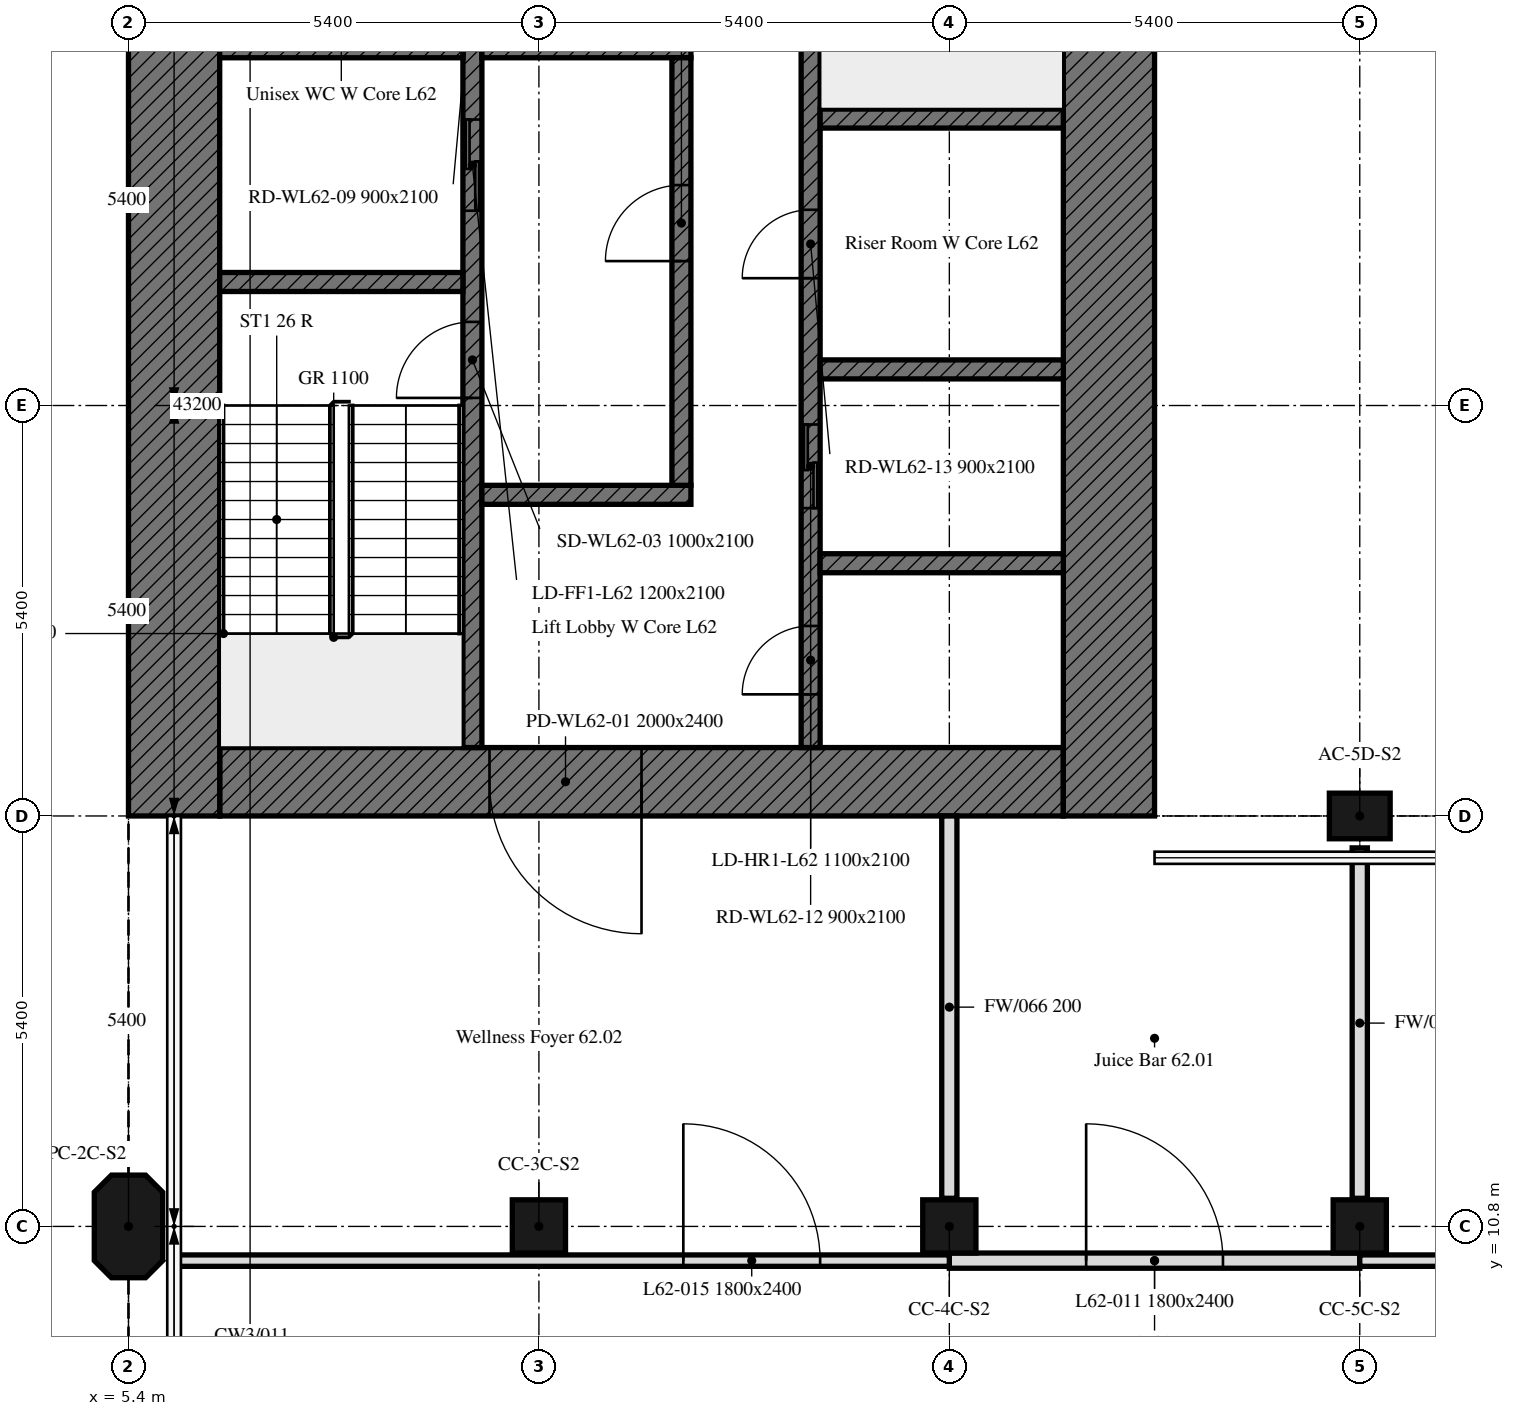
"""IFC4 building model, lengths in metres.
Left out: names, types, materials, properties, quantities, classifications, styles, units other than length and angle.
Written with IfcOpenShell. Run it as: python <this file> out.ifc"""

import sys

from ifc_helpers import new_model, si_unit, direction, frame, frame_2d, origin, origin_2d, place, context, subcontext, project, spatial, polyline, rectangle, outline, extrude, element, fill, save


model = new_model("IFC4")
c1 = context("Model", 3, precision=1e-05, world=origin(), true_north=direction((0.0, 1.0)))
c2 = subcontext(c1, "Body", "Model", "MODEL_VIEW")
j1 = project(units=[si_unit("LENGTHUNIT", "METRE"), si_unit("PLANEANGLEUNIT", "RADIAN")], contexts=[c1])
p1 = place(None, origin())
s1 = spatial("IfcSite", under=j1, at=p1, CompositionType="ELEMENT")
p2 = place(p1, origin())
s2 = spatial("IfcBuilding", under=s1, at=p2, CompositionType="ELEMENT")
p3 = place(p2, frame((0.0, 0.0, 255.7)))
s3 = spatial("IfcBuildingStorey", under=s2, at=p3, CompositionType="ELEMENT", Elevation=255.7)
p4 = place(p3, frame((5.4, 10.8, 0.0), z_axis=(0.0, 0.0, 1.0), x_axis=(0.0, 1.0, 0.0)))
e1 = element("IfcColumn", 1, at=p4, inside=s3, PredefinedType="COLUMN", context=c2, shape_type="SweptSolid", body=[
    extrude(outline(polyline([(-0.45, -0.45), (0.45, -0.45), (0.675, -0.225), (0.675, 0.225), (0.45, 0.45), (-0.45, 0.45), (-0.675, 0.225), (-0.675, -0.225), (-0.45, -0.45)])), origin(), (0.0, 0.0, 1.0), 4.5),
])
for number, where, z_axis, x_axis in (
    (2, (10.8, 10.8, 0.0), (0.0, 0.0, 1.0), (1.0, 0.0, 0.0)),
    (3, (16.2, 10.8, 0.0), (0.0, 0.0, 1.0), (1.0, 0.0, 0.0)),
    (4, (21.6, 10.8, 0.0), (0.0, 0.0, 1.0), (1.0, 0.0, 0.0)),
):
    element("IfcColumn", number, at=place(p3, frame(where, z_axis=z_axis, x_axis=x_axis)), inside=s3, PredefinedType="COLUMN", context=c2, shape_type="SweptSolid", body=[
        extrude(rectangle(XDim=0.7, YDim=0.7, at=origin_2d()), origin(), (0.0, 0.0, 1.0), 4.5),
    ])
p5 = place(p3, frame((21.6, 16.2, 0.0), z_axis=(0.0, 0.0, 1.0), x_axis=(1.0, 0.0, 0.0)))
e5 = element("IfcColumn", 5, at=p5, inside=s3, PredefinedType="COLUMN", context=c2, shape_type="SweptSolid", body=[
    extrude(rectangle(XDim=0.8, YDim=0.6, at=origin_2d()), origin(), (0.0, 0.0, 1.0), 4.5),
])
p6 = place(p3, frame((17.7, 16.65, 0.0), z_axis=(0.0, 0.0, 1.0), x_axis=(-1.0, 0.0, 0.0)))
e6 = element("IfcWall", 6, at=p6, inside=s3, PredefinedType="SOLIDWALL", context=c2, shape_type="SweptSolid", body=[
    extrude(rectangle(XDim=11.1, YDim=0.9, at=frame_2d((5.55, 0.0))), origin(), (0.0, 0.0, 1.0), 4.5),
])
p7 = place(p6, frame((5.55, 0.0, 0.0)))
e7 = element("IfcOpeningElement", 7, at=p7, cuts=e6, PredefinedType="OPENING", context=c2, shape_type="SweptSolid", body=[
    extrude(rectangle(XDim=2.0, YDim=2.4, at=frame_2d((1.0, 1.2))), frame((0.0, 0.45, 0.0), z_axis=(0.0, -1.0, 0.0), x_axis=(1.0, 0.0, 0.0)), (0.0, 0.0, 1.0), 0.9),
])
for number, where, z_axis, x_axis in (
    (8, (6.0, 16.2, 0.0), (0.0, 0.0, 1.0), (0.0, 1.0, 0.0)),
    (9, (18.3, 32.4, 0.0), (0.0, 0.0, 1.0), (0.0, -1.0, 0.0)),
):
    element("IfcWall", number, at=place(p3, frame(where, z_axis=z_axis, x_axis=x_axis)), inside=s3, PredefinedType="SOLIDWALL", context=c2, shape_type="SweptSolid", body=[
        extrude(rectangle(XDim=16.2, YDim=1.2, at=frame_2d((8.1, 0.0))), origin(), (0.0, 0.0, 1.0), 4.5),
    ])
p8 = place(p3, frame((9.925, 17.1, 0.0), z_axis=(0.0, 0.0, 1.0), x_axis=(0.0, 1.0, 0.0)))
e10 = element("IfcWall", 10, at=p8, inside=s3, PredefinedType="SOLIDWALL", context=c2, shape_type="SweptSolid", body=[
    extrude(rectangle(XDim=14.4, YDim=0.25, at=frame_2d((7.2, 0.0))), origin(), (0.0, 0.0, 1.0), 4.5),
])
p9 = place(p8, frame((4.6, 0.0, 0.0)))
e11 = element("IfcOpeningElement", 11, at=p9, cuts=e10, PredefinedType="OPENING", context=c2, shape_type="SweptSolid", body=[
    extrude(rectangle(XDim=1.0, YDim=2.1, at=frame_2d((0.5, 1.05))), frame((0.0, 0.125, 0.0), z_axis=(0.0, -1.0, 0.0), x_axis=(1.0, 0.0, 0.0)), (0.0, 0.0, 1.0), 0.25),
])
p10 = place(p8, frame((7.062, 0.0, 0.0)))
e12 = element("IfcOpeningElement", 12, at=p10, cuts=e10, PredefinedType="OPENING", context=c2, shape_type="SweptSolid", body=[
    extrude(rectangle(XDim=1.2, YDim=2.1, at=frame_2d((0.6, 1.05))), frame((0.0, 0.125, 0.0), z_axis=(0.0, -1.0, 0.0), x_axis=(1.0, 0.0, 0.0)), (0.0, 0.0, 1.0), 0.25),
])
p11 = place(p8, frame((9.726, 0.0, 0.0)))
e13 = element("IfcOpeningElement", 13, at=p11, cuts=e10, PredefinedType="OPENING", context=c2, shape_type="SweptSolid", body=[
    extrude(rectangle(XDim=0.9, YDim=2.1, at=frame_2d((0.45, 1.05))), frame((0.0, 0.125, 0.0), z_axis=(0.0, -1.0, 0.0), x_axis=(1.0, 0.0, 0.0)), (0.0, 0.0, 1.0), 0.25),
])
p12 = place(p8, frame((11.539, 0.0, 0.0)))
e14 = element("IfcOpeningElement", 14, at=p12, cuts=e10, PredefinedType="OPENING", context=c2, shape_type="SweptSolid", body=[
    extrude(rectangle(XDim=0.9, YDim=2.1, at=frame_2d((0.45, 1.05))), frame((0.0, 0.125, 0.0), z_axis=(0.0, -1.0, 0.0), x_axis=(1.0, 0.0, 0.0)), (0.0, 0.0, 1.0), 0.25),
])
p13 = place(p8, frame((13.226, 0.0, 0.0)))
e15 = element("IfcOpeningElement", 15, at=p13, cuts=e10, PredefinedType="OPENING", context=c2, shape_type="SweptSolid", body=[
    extrude(rectangle(XDim=0.9, YDim=2.1, at=frame_2d((0.45, 1.05))), frame((0.0, 0.125, 0.0), z_axis=(0.0, -1.0, 0.0), x_axis=(1.0, 0.0, 0.0)), (0.0, 0.0, 1.0), 0.25),
])
p14 = place(p3, frame((14.375, 17.1, 0.0), z_axis=(0.0, 0.0, 1.0), x_axis=(0.0, 1.0, 0.0)))
e16 = element("IfcWall", 16, at=p14, inside=s3, PredefinedType="SOLIDWALL", context=c2, shape_type="SweptSolid", body=[
    extrude(rectangle(XDim=14.4, YDim=0.25, at=frame_2d((7.2, 0.0))), origin(), (0.0, 0.0, 1.0), 4.5),
])
p15 = place(p14, frame((13.15, 0.0, 0.0)))
e17 = element("IfcOpeningElement", 17, at=p15, cuts=e16, PredefinedType="OPENING", context=c2, shape_type="SweptSolid", body=[
    extrude(rectangle(XDim=1.0, YDim=2.1, at=frame_2d((0.5, 1.05))), frame((0.0, 0.125, 0.0), z_axis=(0.0, -1.0, 0.0), x_axis=(1.0, 0.0, 0.0)), (0.0, 0.0, 1.0), 0.25),
])
p16 = place(p14, frame((3.15, 0.0, 0.0)))
e18 = element("IfcOpeningElement", 18, at=p16, cuts=e16, PredefinedType="OPENING", context=c2, shape_type="SweptSolid", body=[
    extrude(rectangle(XDim=1.1, YDim=2.1, at=frame_2d((0.55, 1.05))), frame((0.0, 0.125, 0.0), z_axis=(0.0, -1.0, 0.0), x_axis=(1.0, 0.0, 0.0)), (0.0, 0.0, 1.0), 0.25),
])
p17 = place(p14, frame((0.7, 0.0, 0.0)))
e19 = element("IfcOpeningElement", 19, at=p17, cuts=e16, PredefinedType="OPENING", context=c2, shape_type="SweptSolid", body=[
    extrude(rectangle(XDim=0.9, YDim=2.1, at=frame_2d((0.45, 1.05))), frame((0.0, 0.125, 0.0), z_axis=(0.0, -1.0, 0.0), x_axis=(1.0, 0.0, 0.0)), (0.0, 0.0, 1.0), 0.25),
])
p18 = place(p14, frame((6.175, 0.0, 0.0)))
e20 = element("IfcOpeningElement", 20, at=p18, cuts=e16, PredefinedType="OPENING", context=c2, shape_type="SweptSolid", body=[
    extrude(rectangle(XDim=0.9, YDim=2.1, at=frame_2d((0.45, 1.05))), frame((0.0, 0.125, 0.0), z_axis=(0.0, -1.0, 0.0), x_axis=(1.0, 0.0, 0.0)), (0.0, 0.0, 1.0), 0.25),
])
for number, where, z_axis, x_axis in (
    (21, (6.6, 23.225, 0.0), (0.0, 0.0, 1.0), (1.0, 0.0, 0.0)),
    (22, (14.5, 25.375, 0.0), (0.0, 0.0, 1.0), (1.0, 0.0, 0.0)),
    (23, (14.5, 22.075, 0.0), (0.0, 0.0, 1.0), (1.0, 0.0, 0.0)),
    (24, (6.6, 26.3, 0.0), (0.0, 0.0, 1.0), (1.0, 0.0, 0.0)),
):
    element("IfcWall", number, at=place(p3, frame(where, z_axis=z_axis, x_axis=x_axis)), inside=s3, PredefinedType="SOLIDWALL", context=c2, shape_type="SweptSolid", body=[
        extrude(rectangle(XDim=3.2, YDim=0.25, at=frame_2d((1.6, 0.0))), origin(), (0.0, 0.0, 1.0), 4.5),
    ])
for number, where, z_axis, x_axis in (
    (25, (10.05, 26.3, 0.0), (0.0, 0.0, 1.0), (1.0, 0.0, 0.0)),
    (26, (10.05, 20.425, 0.0), (0.0, 0.0, 1.0), (1.0, 0.0, 0.0)),
):
    element("IfcWall", number, at=place(p3, frame(where, z_axis=z_axis, x_axis=x_axis)), inside=s3, PredefinedType="SOLIDWALL", context=c2, shape_type="SweptSolid", body=[
        extrude(rectangle(XDim=2.75, YDim=0.25, at=frame_2d((1.375, 0.0))), origin(), (0.0, 0.0, 1.0), 4.5),
    ])
p19 = place(p3, frame((12.675, 20.55, 0.0), z_axis=(0.0, 0.0, 1.0), x_axis=(0.0, 1.0, 0.0)))
e27 = element("IfcWall", 27, at=p19, inside=s3, PredefinedType="SOLIDWALL", context=c2, shape_type="SweptSolid", body=[
    extrude(rectangle(XDim=5.625, YDim=0.25, at=frame_2d((2.812, 0.0))), origin(), (0.0, 0.0, 1.0), 4.5),
])
p20 = place(p19, frame((2.95, 0.0, 0.0)))
e28 = element("IfcOpeningElement", 28, at=p20, cuts=e27, PredefinedType="OPENING", context=c2, shape_type="SweptSolid", body=[
    extrude(rectangle(XDim=1.0, YDim=2.1, at=frame_2d((0.5, 1.05))), frame((0.0, 0.125, 0.0), z_axis=(0.0, -1.0, 0.0), x_axis=(1.0, 0.0, 0.0)), (0.0, 0.0, 1.0), 0.25),
])
p21 = place(p3, frame((14.5, 19.525, 0.0), z_axis=(0.0, 0.0, 1.0), x_axis=(1.0, 0.0, 0.0)))
e29 = element("IfcWall", 29, at=p21, inside=s3, PredefinedType="SOLIDWALL", context=c2, shape_type="SweptSolid", body=[
    extrude(rectangle(XDim=3.2, YDim=0.25, at=frame_2d((1.6, 0.0))), origin(), (0.0, 0.0, 1.0), 4.5),
])
p22 = place(p3, frame((21.6, 15.78, 0.0), z_axis=(0.0, 0.0, 1.0), x_axis=(0.0, -1.0, 0.0)))
e30 = element("IfcWall", 30, at=p22, inside=s3, PredefinedType="PARTITIONING", context=c2, shape_type="SweptSolid", body=[
    extrude(rectangle(XDim=4.61, YDim=0.2, at=frame_2d((2.305, 0.0))), origin(), (0.0, 0.0, 1.0), 3.75),
])
p23 = place(p3, frame((16.2, 10.35, 0.0), z_axis=(0.0, 0.0, 1.0), x_axis=(1.0, 0.0, 0.0)))
e31 = element("IfcWall", 31, at=p23, inside=s3, PredefinedType="PARTITIONING", context=c2, shape_type="SweptSolid", body=[
    extrude(rectangle(XDim=5.4, YDim=0.2, at=frame_2d((2.7, 0.0))), origin(), (0.0, 0.0, 1.0), 4.5),
])
p24 = place(p23, frame((1.8, 0.0, 0.0)))
e32 = element("IfcOpeningElement", 32, at=p24, cuts=e31, PredefinedType="OPENING", context=c2, shape_type="SweptSolid", body=[
    extrude(rectangle(XDim=1.8, YDim=2.4, at=frame_2d((0.9, 1.2))), frame((0.0, 0.1, 0.0), z_axis=(0.0, -1.0, 0.0), x_axis=(1.0, 0.0, 0.0)), (0.0, 0.0, 1.0), 0.2),
])
p25 = place(p3, frame((16.2, 16.2, 0.0), z_axis=(0.0, 0.0, 1.0), x_axis=(0.0, -1.0, 0.0)))
e33 = element("IfcWall", 33, at=p25, inside=s3, PredefinedType="PARTITIONING", context=c2, shape_type="SweptSolid", body=[
    extrude(rectangle(XDim=5.03, YDim=0.2, at=frame_2d((2.515, 0.0))), origin(), (0.0, 0.0, 1.0), 3.75),
])
p26 = place(p3, frame((21.6, 10.35, 0.0), z_axis=(0.0, 0.0, 1.0), x_axis=(1.0, 0.0, 0.0)))
e34 = element("IfcWall", 34, at=p26, inside=s3, PredefinedType="PARTITIONING", context=c2, shape_type="SweptSolid", body=[
    extrude(rectangle(XDim=21.0, YDim=0.15, at=frame_2d((10.5, 0.0))), origin(), (0.0, 0.0, 1.0), 3.75),
])
p27 = place(p26, frame((7.3, 0.0, 0.0)))
e35 = element("IfcOpeningElement", 35, at=p27, cuts=e34, PredefinedType="OPENING", context=c2, shape_type="SweptSolid", body=[
    extrude(rectangle(XDim=1.8, YDim=2.4, at=frame_2d((0.9, 1.2))), frame((0.0, 0.075, 0.0), z_axis=(0.0, -1.0, 0.0), x_axis=(1.0, 0.0, 0.0)), (0.0, 0.0, 1.0), 0.15),
])
p28 = place(p26, frame((18.1, 0.0, 0.0)))
e36 = element("IfcOpeningElement", 36, at=p28, cuts=e34, PredefinedType="OPENING", context=c2, shape_type="SweptSolid", body=[
    extrude(rectangle(XDim=1.8, YDim=2.4, at=frame_2d((0.9, 1.2))), frame((0.0, 0.075, 0.0), z_axis=(0.0, -1.0, 0.0), x_axis=(1.0, 0.0, 0.0)), (0.0, 0.0, 1.0), 0.15),
])
p29 = place(p3, frame((6.0, 10.35, 0.0), z_axis=(0.0, 0.0, 1.0), x_axis=(1.0, 0.0, 0.0)))
e37 = element("IfcWall", 37, at=p29, inside=s3, PredefinedType="PARTITIONING", context=c2, shape_type="SweptSolid", body=[
    extrude(rectangle(XDim=10.2, YDim=0.15, at=frame_2d((5.1, 0.0))), origin(), (0.0, 0.0, 1.0), 3.75),
])
p30 = place(p29, frame((6.7, 0.0, 0.0)))
e38 = element("IfcOpeningElement", 38, at=p30, cuts=e37, PredefinedType="OPENING", context=c2, shape_type="SweptSolid", body=[
    extrude(rectangle(XDim=1.8, YDim=2.4, at=frame_2d((0.9, 1.2))), frame((0.0, 0.075, 0.0), z_axis=(0.0, -1.0, 0.0), x_axis=(1.0, 0.0, 0.0)), (0.0, 0.0, 1.0), 0.15),
])
p31 = place(p7, origin())
e39 = element("IfcDoor", 39, at=p31, inside=s3, OperationType="DOUBLE_DOOR_SINGLE_SWING", PredefinedType="DOOR", context=c2, shape_type="SweptSolid", body=[
    extrude(rectangle(XDim=2.0, YDim=2.4, at=frame_2d((1.0, 1.2))), frame((0.0, 0.025, 0.0), z_axis=(0.0, -1.0, 0.0), x_axis=(1.0, 0.0, 0.0)), (0.0, 0.0, 1.0), 0.05),
])
fill(e7, e39)
p32 = place(p9, origin())
e40 = element("IfcDoor", 40, at=p32, inside=s3, OperationType="SINGLE_SWING_LEFT", PredefinedType="DOOR", context=c2, shape_type="SweptSolid", body=[
    extrude(rectangle(XDim=1.0, YDim=2.1, at=frame_2d((0.5, 1.05))), frame((0.0, 0.025, 0.0), z_axis=(0.0, -1.0, 0.0), x_axis=(1.0, 0.0, 0.0)), (0.0, 0.0, 1.0), 0.05),
])
fill(e11, e40)
p33 = place(p20, origin())
e41 = element("IfcDoor", 41, at=p33, inside=s3, OperationType="SINGLE_SWING_LEFT", PredefinedType="DOOR", context=c2, shape_type="SweptSolid", body=[
    extrude(rectangle(XDim=1.0, YDim=2.1, at=frame_2d((0.5, 1.05))), frame((0.0, 0.025, 0.0), z_axis=(0.0, -1.0, 0.0), x_axis=(1.0, 0.0, 0.0)), (0.0, 0.0, 1.0), 0.05),
])
fill(e28, e41)
p34 = place(p10, origin())
e42 = element("IfcDoor", 42, at=p34, inside=s3, OperationType="DOUBLE_DOOR_SLIDING", PredefinedType="DOOR", context=c2, shape_type="SweptSolid", body=[
    extrude(rectangle(XDim=1.2, YDim=2.1, at=frame_2d((0.6, 1.05))), frame((0.0, 0.025, 0.0), z_axis=(0.0, -1.0, 0.0), x_axis=(1.0, 0.0, 0.0)), (0.0, 0.0, 1.0), 0.05),
])
fill(e12, e42)
p35 = place(p16, origin())
e43 = element("IfcDoor", 43, at=p35, inside=s3, OperationType="DOUBLE_DOOR_SLIDING", PredefinedType="DOOR", context=c2, shape_type="SweptSolid", body=[
    extrude(rectangle(XDim=1.1, YDim=2.1, at=frame_2d((0.55, 1.05))), frame((0.0, 0.025, 0.0), z_axis=(0.0, -1.0, 0.0), x_axis=(1.0, 0.0, 0.0)), (0.0, 0.0, 1.0), 0.05),
])
fill(e18, e43)
p36 = place(p17, origin())
e44 = element("IfcDoor", 44, at=p36, inside=s3, OperationType="SINGLE_SWING_LEFT", PredefinedType="DOOR", context=c2, shape_type="SweptSolid", body=[
    extrude(rectangle(XDim=0.9, YDim=2.1, at=frame_2d((0.45, 1.05))), frame((0.0, 0.025, 0.0), z_axis=(0.0, -1.0, 0.0), x_axis=(1.0, 0.0, 0.0)), (0.0, 0.0, 1.0), 0.05),
])
fill(e19, e44)
p37 = place(p18, origin())
e45 = element("IfcDoor", 45, at=p37, inside=s3, OperationType="SINGLE_SWING_LEFT", PredefinedType="DOOR", context=c2, shape_type="SweptSolid", body=[
    extrude(rectangle(XDim=0.9, YDim=2.1, at=frame_2d((0.45, 1.05))), frame((0.0, 0.025, 0.0), z_axis=(0.0, -1.0, 0.0), x_axis=(1.0, 0.0, 0.0)), (0.0, 0.0, 1.0), 0.05),
])
fill(e20, e45)
p38 = place(p24, origin())
e46 = element("IfcDoor", 46, at=p38, inside=s3, OperationType="DOUBLE_DOOR_SINGLE_SWING", PredefinedType="DOOR", context=c2, shape_type="SweptSolid", body=[
    extrude(rectangle(XDim=1.8, YDim=2.4, at=frame_2d((0.9, 1.2))), frame((0.0, 0.025, 0.0), z_axis=(0.0, -1.0, 0.0), x_axis=(1.0, 0.0, 0.0)), (0.0, 0.0, 1.0), 0.05),
])
fill(e32, e46)
p39 = place(p30, origin())
e47 = element("IfcDoor", 47, at=p39, inside=s3, OperationType="DOUBLE_DOOR_SINGLE_SWING", PredefinedType="DOOR", context=c2, shape_type="SweptSolid", body=[
    extrude(rectangle(XDim=1.8, YDim=2.4, at=frame_2d((0.9, 1.2))), frame((0.0, 0.025, 0.0), z_axis=(0.0, -1.0, 0.0), x_axis=(1.0, 0.0, 0.0)), (0.0, 0.0, 1.0), 0.05),
])
fill(e38, e47)
save(model, sys.argv[1])
